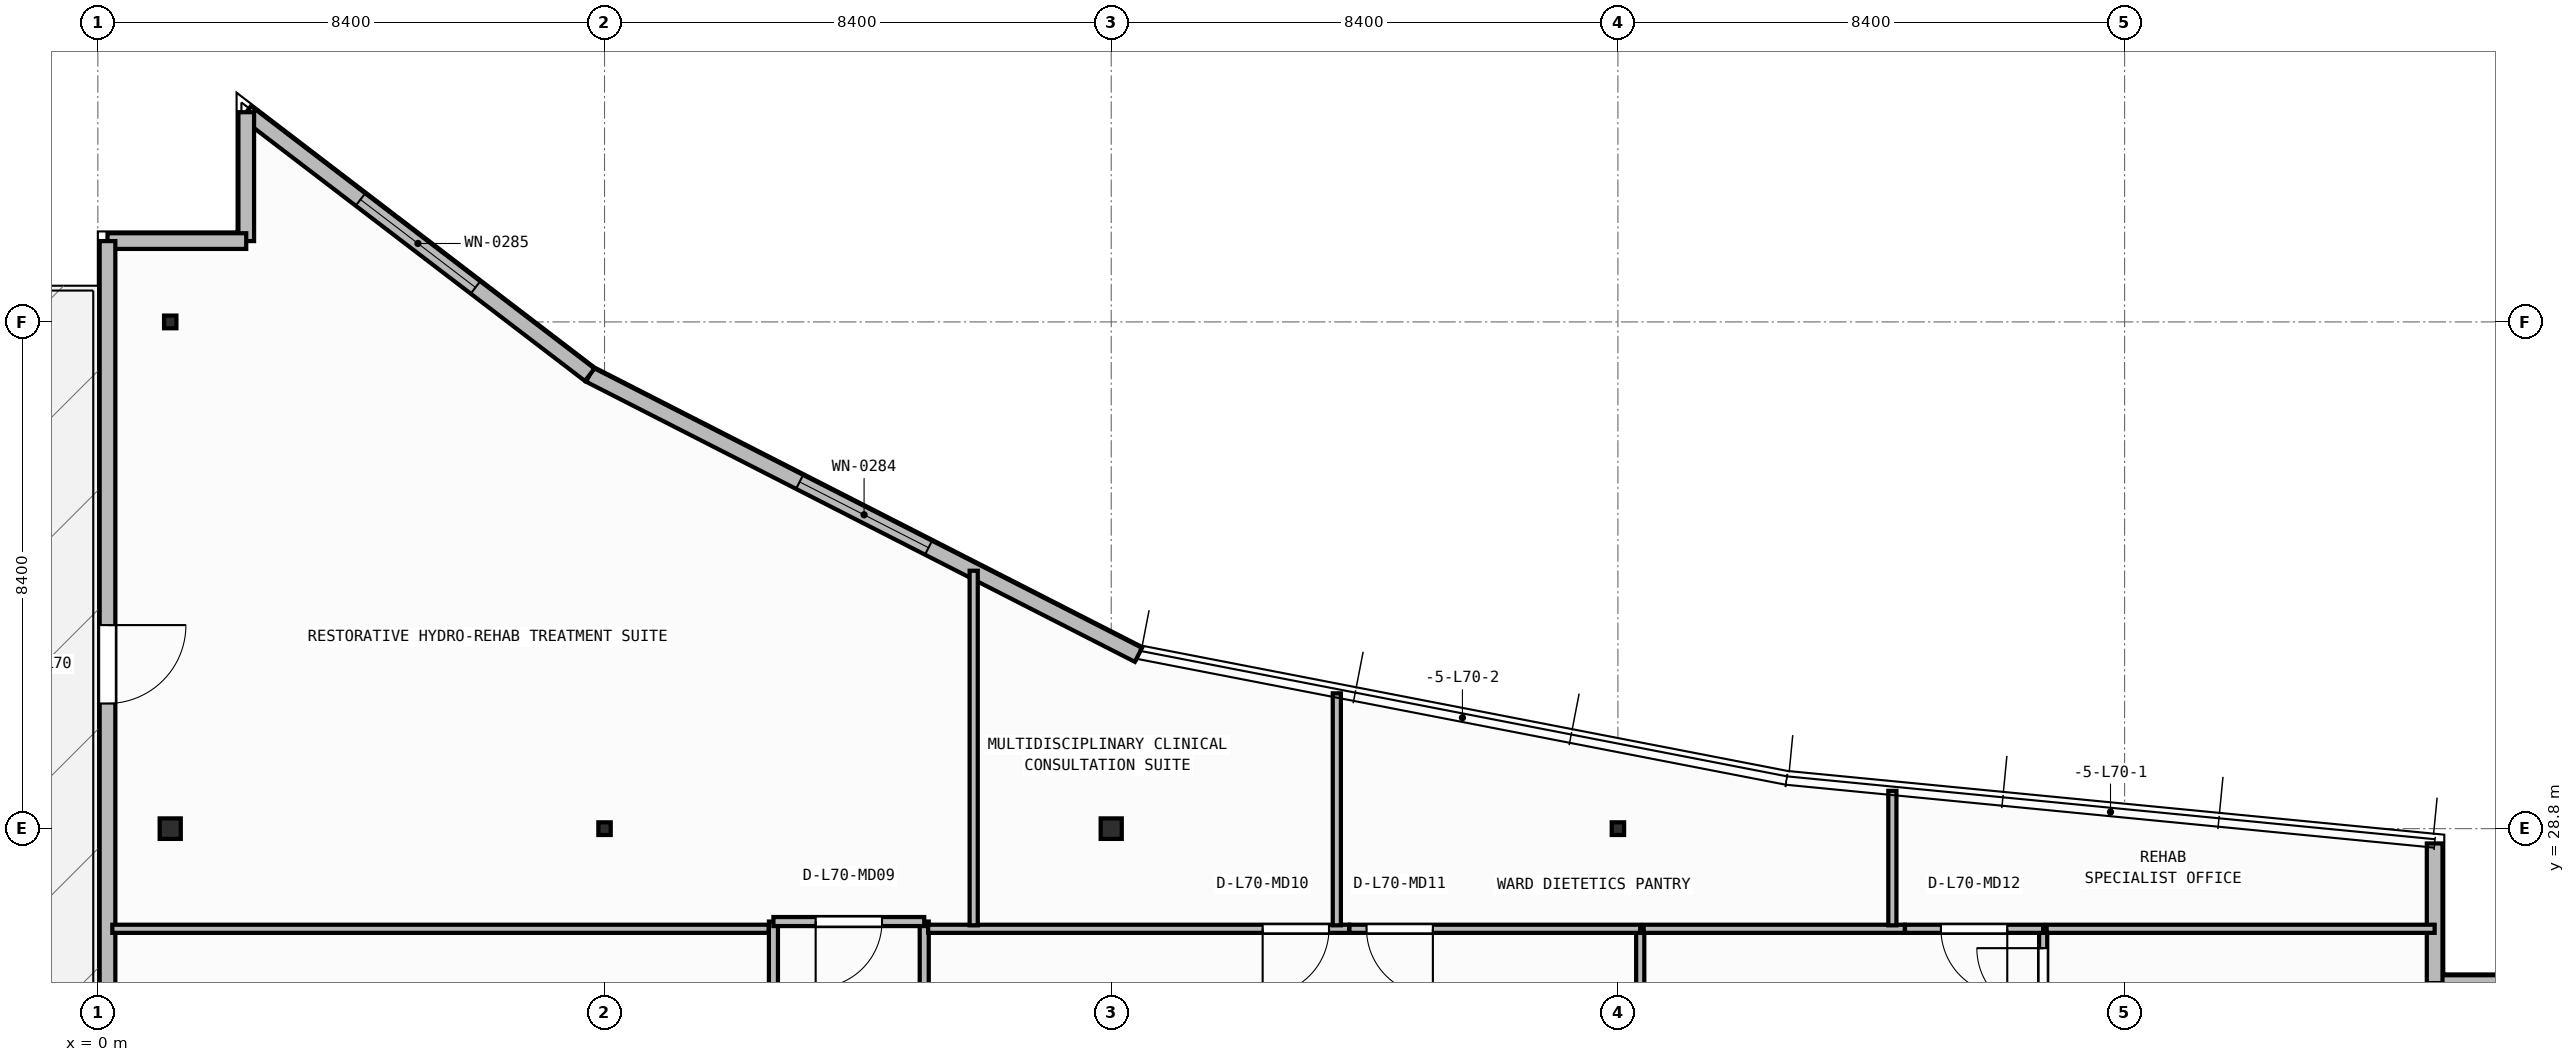
"""IFC4 building model, lengths in metres.
Left out: names, types, materials, properties, quantities, classifications, styles, units other than length and angle.
Written with IfcOpenShell. Run it as: python <this file> out.ifc"""

import sys

from ifc_helpers import new_model, si_unit, direction, frame, frame_2d, origin, origin_2d, place, context, subcontext, project, spatial, rectangle, i_section, extrude, element, fill, save


model = new_model("IFC4")
c1 = context("Model", 3, precision=1e-05, world=origin(), true_north=direction((0.0, 1.0)))
c2 = subcontext(c1, "Body", "Model", "MODEL_VIEW")
j1 = project(units=[si_unit("LENGTHUNIT", "METRE"), si_unit("PLANEANGLEUNIT", "RADIAN")], contexts=[c1])
p1 = place(None, origin())
s1 = spatial("IfcSite", under=j1, at=p1, CompositionType="ELEMENT")
p2 = place(p1, origin())
s2 = spatial("IfcBuilding", under=s1, at=p2, CompositionType="ELEMENT")
p3 = place(p2, frame((0.0, 0.0, 284.2)))
s3 = spatial("IfcBuildingStorey", under=s2, at=p3, CompositionType="ELEMENT", Elevation=284.2)
p4 = place(p3, frame((1.2, 28.8, 0.0), z_axis=(0.0, 0.0, 1.0), x_axis=(1.0, 0.0, 0.0)))
e1 = element("IfcColumn", 1, at=p4, inside=s3, PredefinedType="COLUMN", context=c2, shape_type="SweptSolid", body=[
    extrude(i_section(OverallWidth=0.35, OverallDepth=0.34, WebThickness=0.016, FlangeThickness=0.028, at=origin_2d()), origin(), (0.0, 0.0, 1.0), 3.95),
])
p5 = place(p3, frame((8.4, 28.8, 0.0), z_axis=(0.0, 0.0, 1.0), x_axis=(1.0, 0.0, 0.0)))
e2 = element("IfcColumn", 2, at=p5, inside=s3, PredefinedType="COLUMN", context=c2, shape_type="SweptSolid", body=[
    extrude(i_section(OverallWidth=0.205, OverallDepth=0.21, WebThickness=0.009, FlangeThickness=0.014, FilletRadius=0.011, at=origin_2d()), origin(), (0.0, 0.0, 1.0), 3.95),
])
p6 = place(p3, frame((16.8, 28.8, 0.0), z_axis=(0.0, 0.0, 1.0), x_axis=(1.0, 0.0, 0.0)))
e3 = element("IfcColumn", 3, at=p6, inside=s3, PredefinedType="COLUMN", context=c2, shape_type="SweptSolid", body=[
    extrude(i_section(OverallWidth=0.35, OverallDepth=0.34, WebThickness=0.016, FlangeThickness=0.028, at=origin_2d()), origin(), (0.0, 0.0, 1.0), 3.95),
])
for number, where, z_axis, x_axis in (
    (4, (25.2, 28.8, 0.0), (0.0, 0.0, 1.0), (1.0, 0.0, 0.0)),
    (5, (1.2, 37.2, 0.0), (0.0, 0.0, 1.0), (1.0, 0.0, 0.0)),
):
    element("IfcColumn", number, at=place(p3, frame(where, z_axis=z_axis, x_axis=x_axis)), inside=s3, PredefinedType="COLUMN", context=c2, shape_type="SweptSolid", body=[
        extrude(i_section(OverallWidth=0.205, OverallDepth=0.21, WebThickness=0.009, FlangeThickness=0.014, FilletRadius=0.011, at=origin_2d()), origin(), (0.0, 0.0, 1.0), 3.95),
    ])
p7 = place(p3, frame((41.04, 26.24, 0.0), z_axis=(0.0, 0.0, 1.0), x_axis=(-1.0, 0.0, 0.0)))
e6 = element("IfcWall", 6, at=p7, inside=s3, PredefinedType="STANDARD", context=c2, shape_type="SweptSolid", body=[
    extrude(rectangle(XDim=2.3, YDim=0.26, at=frame_2d((1.15, 0.0))), origin(), (0.0, 0.0, 1.0), 3.71),
])
p8 = place(p3, frame((38.74, 26.24, 0.0), z_axis=(0.0, 0.0, 1.0), x_axis=(0.0, 1.0, 0.0)))
e7 = element("IfcWall", 7, at=p8, inside=s3, PredefinedType="STANDARD", context=c2, shape_type="SweptSolid", body=[
    extrude(rectangle(XDim=2.315, YDim=0.26, at=frame_2d((1.157, 0.0))), origin(), (0.0, 0.0, 1.0), 3.71),
])
p9 = place(p3, frame((17.251, 31.681, 0.0), z_axis=(0.0, 0.0, 1.0), x_axis=(-0.89069629535, 0.454598844532, 0.0)))
e8 = element("IfcWall", 8, at=p9, inside=s3, PredefinedType="STANDARD", context=c2, shape_type="SweptSolid", body=[
    extrude(rectangle(XDim=10.214, YDim=0.26, at=frame_2d((5.107, 0.0))), origin(), (0.0, 0.0, 1.0), 3.71),
])
p10 = place(p9, frame((3.907, 0.0, 0.9)))
e9 = element("IfcOpeningElement", 9, at=p10, cuts=e8, PredefinedType="OPENING", context=c2, shape_type="SweptSolid", body=[
    extrude(rectangle(XDim=2.4, YDim=1.65, at=frame_2d((1.2, 0.825))), frame((0.0, 0.14, 0.0), z_axis=(0.0, -1.0, 0.0), x_axis=(1.0, 0.0, 0.0)), (0.0, 0.0, 1.0), 0.28),
])
p11 = place(p3, frame((8.154, 36.324, 0.0), z_axis=(0.0, 0.0, 1.0), x_axis=(-0.794522176632, 0.607235136368, 0.0)))
e10 = element("IfcWall", 10, at=p11, inside=s3, PredefinedType="STANDARD", context=c2, shape_type="SweptSolid", body=[
    extrude(rectangle(XDim=7.167, YDim=0.26, at=frame_2d((3.583, 0.0))), origin(), (0.0, 0.0, 1.0), 3.71),
])
p12 = place(p11, frame((2.384, 0.0, 0.9)))
e11 = element("IfcOpeningElement", 11, at=p12, cuts=e10, PredefinedType="OPENING", context=c2, shape_type="SweptSolid", body=[
    extrude(rectangle(XDim=2.4, YDim=1.65, at=frame_2d((1.2, 0.825))), frame((0.0, 0.14, 0.0), z_axis=(0.0, -1.0, 0.0), x_axis=(1.0, 0.0, 0.0)), (0.0, 0.0, 1.0), 0.28),
])
p13 = place(p3, frame((2.46, 40.676, 0.0), z_axis=(0.0, 0.0, 1.0), x_axis=(0.0, -1.0, 0.0)))
e12 = element("IfcWall", 12, at=p13, inside=s3, PredefinedType="STANDARD", context=c2, shape_type="SweptSolid", body=[
    extrude(rectangle(XDim=2.136, YDim=0.26, at=frame_2d((1.068, 0.0))), origin(), (0.0, 0.0, 1.0), 3.71),
])
p14 = place(p3, frame((2.46, 38.54, 0.0), z_axis=(0.0, 0.0, 1.0), x_axis=(-1.0, 0.0, 0.0)))
e13 = element("IfcWall", 13, at=p14, inside=s3, PredefinedType="STANDARD", context=c2, shape_type="SweptSolid", body=[
    extrude(rectangle(XDim=2.3, YDim=0.26, at=frame_2d((1.15, 0.0))), origin(), (0.0, 0.0, 1.0), 3.71),
])
p15 = place(p3, frame((0.16, 38.54, 0.0), z_axis=(0.0, 0.0, 1.0), x_axis=(0.0, -1.0, 0.0)))
e14 = element("IfcWall", 14, at=p15, inside=s3, PredefinedType="STANDARD", context=c2, shape_type="SweptSolid", body=[
    extrude(rectangle(XDim=36.08, YDim=0.26, at=frame_2d((18.04, 0.0))), origin(), (0.0, 0.0, 1.0), 3.71),
])
p16 = place(p15, frame((6.365, 0.0, 0.0)))
e15 = element("IfcOpeningElement", 15, at=p16, cuts=e14, PredefinedType="OPENING", context=c2, shape_type="SweptSolid", body=[
    extrude(rectangle(XDim=1.3, YDim=2.15, at=frame_2d((0.65, 1.075))), frame((0.0, 0.14, 0.0), z_axis=(0.0, -1.0, 0.0), x_axis=(1.0, 0.0, 0.0)), (0.0, 0.0, 1.0), 0.28),
])
p17 = place(p3, frame((11.2, 27.26, 0.0), z_axis=(0.0, 0.0, 1.0), x_axis=(0.0, -1.0, 0.0)))
e16 = element("IfcWall", 16, at=p17, inside=s3, PredefinedType="PARTITIONING", context=c2, shape_type="SweptSolid", body=[
    extrude(rectangle(XDim=6.292, YDim=0.15, at=frame_2d((3.146, 0.0))), origin(), (0.0, 0.0, 1.0), 3.71),
])
p18 = place(p17, frame((2.596, 0.0, 0.0)))
e17 = element("IfcOpeningElement", 17, at=p18, cuts=e16, PredefinedType="OPENING", context=c2, shape_type="SweptSolid", body=[
    extrude(rectangle(XDim=1.1, YDim=2.1, at=frame_2d((0.55, 1.05))), frame((0.0, 0.085, 0.0), z_axis=(0.0, -1.0, 0.0), x_axis=(1.0, 0.0, 0.0)), (0.0, 0.0, 1.0), 0.17),
])
p19 = place(p3, frame((13.7, 20.968, 0.0), z_axis=(0.0, 0.0, 1.0), x_axis=(0.0, 1.0, 0.0)))
e18 = element("IfcWall", 18, at=p19, inside=s3, PredefinedType="PARTITIONING", context=c2, shape_type="SweptSolid", body=[
    extrude(rectangle(XDim=6.292, YDim=0.15, at=frame_2d((3.146, 0.0))), origin(), (0.0, 0.0, 1.0), 3.71),
])
p20 = place(p19, frame((2.596, 0.0, 0.0)))
e19 = element("IfcOpeningElement", 19, at=p20, cuts=e18, PredefinedType="OPENING", context=c2, shape_type="SweptSolid", body=[
    extrude(rectangle(XDim=1.1, YDim=2.1, at=frame_2d((0.55, 1.05))), frame((0.0, 0.085, 0.0), z_axis=(0.0, -1.0, 0.0), x_axis=(1.0, 0.0, 0.0)), (0.0, 0.0, 1.0), 0.17),
])
p21 = place(p3, frame((13.7, 27.26, 0.0), z_axis=(0.0, 0.0, 1.0), x_axis=(-1.0, 0.0, 0.0)))
e20 = element("IfcWall", 20, at=p21, inside=s3, PredefinedType="PARTITIONING", context=c2, shape_type="SweptSolid", body=[
    extrude(rectangle(XDim=2.5, YDim=0.15, at=frame_2d((1.25, 0.0))), origin(), (0.0, 0.0, 1.0), 3.71),
])
p22 = place(p21, frame((0.7, 0.0, 0.0)))
e21 = element("IfcOpeningElement", 21, at=p22, cuts=e20, PredefinedType="OPENING", context=c2, shape_type="SweptSolid", body=[
    extrude(rectangle(XDim=1.1, YDim=2.1, at=frame_2d((0.55, 1.05))), frame((0.0, 0.085, 0.0), z_axis=(0.0, -1.0, 0.0), x_axis=(1.0, 0.0, 0.0)), (0.0, 0.0, 1.0), 0.17),
])
p23 = place(p3, frame((11.12, 27.14, 0.0), z_axis=(0.0, 0.0, 1.0), x_axis=(-1.0, 0.0, 0.0)))
e22 = element("IfcWall", 22, at=p23, inside=s3, PredefinedType="PARTITIONING", context=c2, shape_type="SweptSolid", body=[
    extrude(rectangle(XDim=10.88, YDim=0.135, at=frame_2d((5.44, 0.0))), origin(), (0.0, 0.0, 1.0), 3.71),
])
p24 = place(p3, frame((25.57, 20.798, 0.0), z_axis=(0.0, 0.0, 1.0), x_axis=(0.0, 1.0, 0.0)))
e23 = element("IfcWall", 23, at=p24, inside=s3, PredefinedType="PARTITIONING", context=c2, shape_type="SweptSolid", body=[
    extrude(rectangle(XDim=6.342, YDim=0.135, at=frame_2d((3.171, 0.0))), origin(), (0.0, 0.0, 1.0), 3.157),
])
p25 = place(p24, frame((3.227, 0.0, 0.0)))
e24 = element("IfcOpeningElement", 24, at=p25, cuts=e23, PredefinedType="OPENING", context=c2, shape_type="SweptSolid", body=[
    extrude(rectangle(XDim=1.1, YDim=2.1, at=frame_2d((0.55, 1.05))), frame((0.0, 0.077, 0.0), z_axis=(0.0, -1.0, 0.0), x_axis=(1.0, 0.0, 0.0)), (0.0, 0.0, 1.0), 0.155),
])
p26 = place(p3, frame((20.748, 27.14, 0.0), z_axis=(0.0, 0.0, 1.0), x_axis=(-1.0, 0.0, 0.0)))
e25 = element("IfcWall", 25, at=p26, inside=s3, PredefinedType="PARTITIONING", context=c2, shape_type="SweptSolid", body=[
    extrude(rectangle(XDim=6.983, YDim=0.135, at=frame_2d((3.491, 0.0))), origin(), (0.0, 0.0, 1.0), 3.71),
])
p27 = place(p26, frame((0.337, 0.0, 0.0)))
e26 = element("IfcOpeningElement", 26, at=p27, cuts=e25, PredefinedType="OPENING", context=c2, shape_type="SweptSolid", body=[
    extrude(rectangle(XDim=1.1, YDim=2.1, at=frame_2d((0.55, 1.05))), frame((0.0, 0.077, 0.0), z_axis=(0.0, -1.0, 0.0), x_axis=(1.0, 0.0, 0.0)), (0.0, 0.0, 1.0), 0.155),
])
p28 = place(p3, frame((25.57, 27.14, 0.0), z_axis=(0.0, 0.0, 1.0), x_axis=(-1.0, 0.0, 0.0)))
e27 = element("IfcWall", 27, at=p28, inside=s3, PredefinedType="PARTITIONING", context=c2, shape_type="SweptSolid", body=[
    extrude(rectangle(XDim=4.821, YDim=0.135, at=frame_2d((2.41, 0.0))), origin(), (0.0, 0.0, 1.0), 3.71),
])
p29 = place(p28, frame((3.438, 0.0, 0.0)))
e28 = element("IfcOpeningElement", 28, at=p29, cuts=e27, PredefinedType="OPENING", context=c2, shape_type="SweptSolid", body=[
    extrude(rectangle(XDim=1.1, YDim=2.1, at=frame_2d((0.55, 1.05))), frame((0.0, 0.077, 0.0), z_axis=(0.0, -1.0, 0.0), x_axis=(1.0, 0.0, 0.0)), (0.0, 0.0, 1.0), 0.155),
])
p30 = place(p3, frame((32.25, 20.798, 0.0), z_axis=(0.0, 0.0, 1.0), x_axis=(0.0, 1.0, 0.0)))
e29 = element("IfcWall", 29, at=p30, inside=s3, PredefinedType="PARTITIONING", context=c2, shape_type="SweptSolid", body=[
    extrude(rectangle(XDim=6.342, YDim=0.135, at=frame_2d((3.171, 0.0))), origin(), (0.0, 0.0, 1.0), 3.71),
])
p31 = place(p30, frame((4.921, 0.0, 0.0)))
e30 = element("IfcOpeningElement", 30, at=p31, cuts=e29, PredefinedType="OPENING", context=c2, shape_type="SweptSolid", body=[
    extrude(rectangle(XDim=1.1, YDim=2.1, at=frame_2d((0.55, 1.05))), frame((0.0, 0.077, 0.0), z_axis=(0.0, -1.0, 0.0), x_axis=(1.0, 0.0, 0.0)), (0.0, 0.0, 1.0), 0.155),
])
p32 = place(p3, frame((29.958, 27.14, 0.0), z_axis=(0.0, 0.0, 1.0), x_axis=(-1.0, 0.0, 0.0)))
e31 = element("IfcWall", 31, at=p32, inside=s3, PredefinedType="PARTITIONING", context=c2, shape_type="SweptSolid", body=[
    extrude(rectangle(XDim=4.33, YDim=0.135, at=frame_2d((2.165, 0.0))), origin(), (0.0, 0.0, 1.0), 3.71),
])
p33 = place(p3, frame((32.25, 27.14, 0.0), z_axis=(0.0, 0.0, 1.0), x_axis=(-1.0, 0.0, 0.0)))
e32 = element("IfcWall", 32, at=p33, inside=s3, PredefinedType="PARTITIONING", context=c2, shape_type="SweptSolid", body=[
    extrude(rectangle(XDim=2.291, YDim=0.135, at=frame_2d((1.145, 0.0))), origin(), (0.0, 0.0, 1.0), 3.71),
])
p34 = place(p33, frame((0.595, 0.0, 0.0)))
e33 = element("IfcOpeningElement", 33, at=p34, cuts=e32, PredefinedType="OPENING", context=c2, shape_type="SweptSolid", body=[
    extrude(rectangle(XDim=1.1, YDim=2.1, at=frame_2d((0.55, 1.05))), frame((0.0, 0.077, 0.0), z_axis=(0.0, -1.0, 0.0), x_axis=(1.0, 0.0, 0.0)), (0.0, 0.0, 1.0), 0.155),
])
p35 = place(p3, frame((38.74, 27.14, 0.0), z_axis=(0.0, 0.0, 1.0), x_axis=(-1.0, 0.0, 0.0)))
e34 = element("IfcWall", 34, at=p35, inside=s3, PredefinedType="PARTITIONING", context=c2, shape_type="SweptSolid", body=[
    extrude(rectangle(XDim=6.432, YDim=0.135, at=frame_2d((3.216, 0.0))), origin(), (0.0, 0.0, 1.0), 3.71),
])
p36 = place(p3, frame((14.52, 27.198, 0.0), z_axis=(0.0, 0.0, 1.0), x_axis=(0.0, 1.0, 0.0)))
e35 = element("IfcWall", 35, at=p36, inside=s3, PredefinedType="PARTITIONING", context=c2, shape_type="SweptSolid", body=[
    extrude(rectangle(XDim=5.878, YDim=0.135, at=frame_2d((2.939, 0.0))), origin(), (0.0, 0.0, 1.0), 3.71),
])
p37 = place(p3, frame((20.54, 27.198, 0.0), z_axis=(0.0, 0.0, 1.0), x_axis=(0.0, 1.0, 0.0)))
e36 = element("IfcWall", 36, at=p37, inside=s3, PredefinedType="PARTITIONING", context=c2, shape_type="SweptSolid", body=[
    extrude(rectangle(XDim=3.846, YDim=0.135, at=frame_2d((1.923, 0.0))), origin(), (0.0, 0.0, 1.0), 3.71),
])
p38 = place(p3, frame((29.75, 27.198, 0.0), z_axis=(0.0, 0.0, 1.0), x_axis=(0.0, 1.0, 0.0)))
e37 = element("IfcWall", 37, at=p38, inside=s3, PredefinedType="PARTITIONING", context=c2, shape_type="SweptSolid", body=[
    extrude(rectangle(XDim=2.229, YDim=0.135, at=frame_2d((1.115, 0.0))), origin(), (0.0, 0.0, 1.0), 3.71),
])
p39 = place(p10, origin())
e38 = element("IfcWindow", 38, at=p39, inside=s3, PartitioningType="SINGLE_PANEL", PredefinedType="WINDOW", context=c2, shape_type="SweptSolid", body=[
    extrude(rectangle(XDim=2.4, YDim=1.65, at=frame_2d((1.2, 0.825))), frame((0.0, 0.03, 0.0), z_axis=(0.0, -1.0, 0.0), x_axis=(1.0, 0.0, 0.0)), (0.0, 0.0, 1.0), 0.06),
])
fill(e9, e38)
p40 = place(p12, origin())
e39 = element("IfcWindow", 39, at=p40, inside=s3, PartitioningType="SINGLE_PANEL", PredefinedType="WINDOW", context=c2, shape_type="SweptSolid", body=[
    extrude(rectangle(XDim=2.4, YDim=1.65, at=frame_2d((1.2, 0.825))), frame((0.0, 0.03, 0.0), z_axis=(0.0, -1.0, 0.0), x_axis=(1.0, 0.0, 0.0)), (0.0, 0.0, 1.0), 0.06),
])
fill(e11, e39)
p41 = place(p16, origin())
e40 = element("IfcDoor", 40, at=p41, inside=s3, OperationType="SINGLE_SWING_LEFT", PredefinedType="DOOR", context=c2, shape_type="SweptSolid", body=[
    extrude(rectangle(XDim=1.3, YDim=2.15, at=frame_2d((0.65, 1.075))), frame((0.0, 0.025, 0.0), z_axis=(0.0, -1.0, 0.0), x_axis=(1.0, 0.0, 0.0)), (0.0, 0.0, 1.0), 0.05),
])
fill(e15, e40)
p42 = place(p22, origin())
e41 = element("IfcDoor", 41, at=p42, inside=s3, OperationType="SINGLE_SWING_RIGHT", PredefinedType="DOOR", context=c2, shape_type="SweptSolid", body=[
    extrude(rectangle(XDim=1.1, YDim=2.1, at=frame_2d((0.55, 1.05))), frame((0.0, 0.025, 0.0), z_axis=(0.0, -1.0, 0.0), x_axis=(1.0, 0.0, 0.0)), (0.0, 0.0, 1.0), 0.05),
])
fill(e21, e41)
p43 = place(p27, origin())
e42 = element("IfcDoor", 42, at=p43, inside=s3, OperationType="SINGLE_SWING_RIGHT", PredefinedType="DOOR", context=c2, shape_type="SweptSolid", body=[
    extrude(rectangle(XDim=1.1, YDim=2.1, at=frame_2d((0.55, 1.05))), frame((0.0, 0.025, 0.0), z_axis=(0.0, -1.0, 0.0), x_axis=(1.0, 0.0, 0.0)), (0.0, 0.0, 1.0), 0.05),
])
fill(e26, e42)
p44 = place(p29, origin())
e43 = element("IfcDoor", 43, at=p44, inside=s3, OperationType="SINGLE_SWING_LEFT", PredefinedType="DOOR", context=c2, shape_type="SweptSolid", body=[
    extrude(rectangle(XDim=1.1, YDim=2.1, at=frame_2d((0.55, 1.05))), frame((0.0, 0.025, 0.0), z_axis=(0.0, -1.0, 0.0), x_axis=(1.0, 0.0, 0.0)), (0.0, 0.0, 1.0), 0.05),
])
fill(e28, e43)
p45 = place(p31, origin())
e44 = element("IfcDoor", 44, at=p45, inside=s3, OperationType="SINGLE_SWING_RIGHT", PredefinedType="DOOR", context=c2, shape_type="SweptSolid", body=[
    extrude(rectangle(XDim=1.1, YDim=2.1, at=frame_2d((0.55, 1.05))), frame((0.0, 0.025, 0.0), z_axis=(0.0, -1.0, 0.0), x_axis=(1.0, 0.0, 0.0)), (0.0, 0.0, 1.0), 0.05),
])
fill(e30, e44)
p46 = place(p34, origin())
e45 = element("IfcDoor", 45, at=p46, inside=s3, OperationType="SINGLE_SWING_LEFT", PredefinedType="DOOR", context=c2, shape_type="SweptSolid", body=[
    extrude(rectangle(XDim=1.1, YDim=2.1, at=frame_2d((0.55, 1.05))), frame((0.0, 0.025, 0.0), z_axis=(0.0, -1.0, 0.0), x_axis=(1.0, 0.0, 0.0)), (0.0, 0.0, 1.0), 0.05),
])
fill(e33, e45)
save(model, sys.argv[1])
